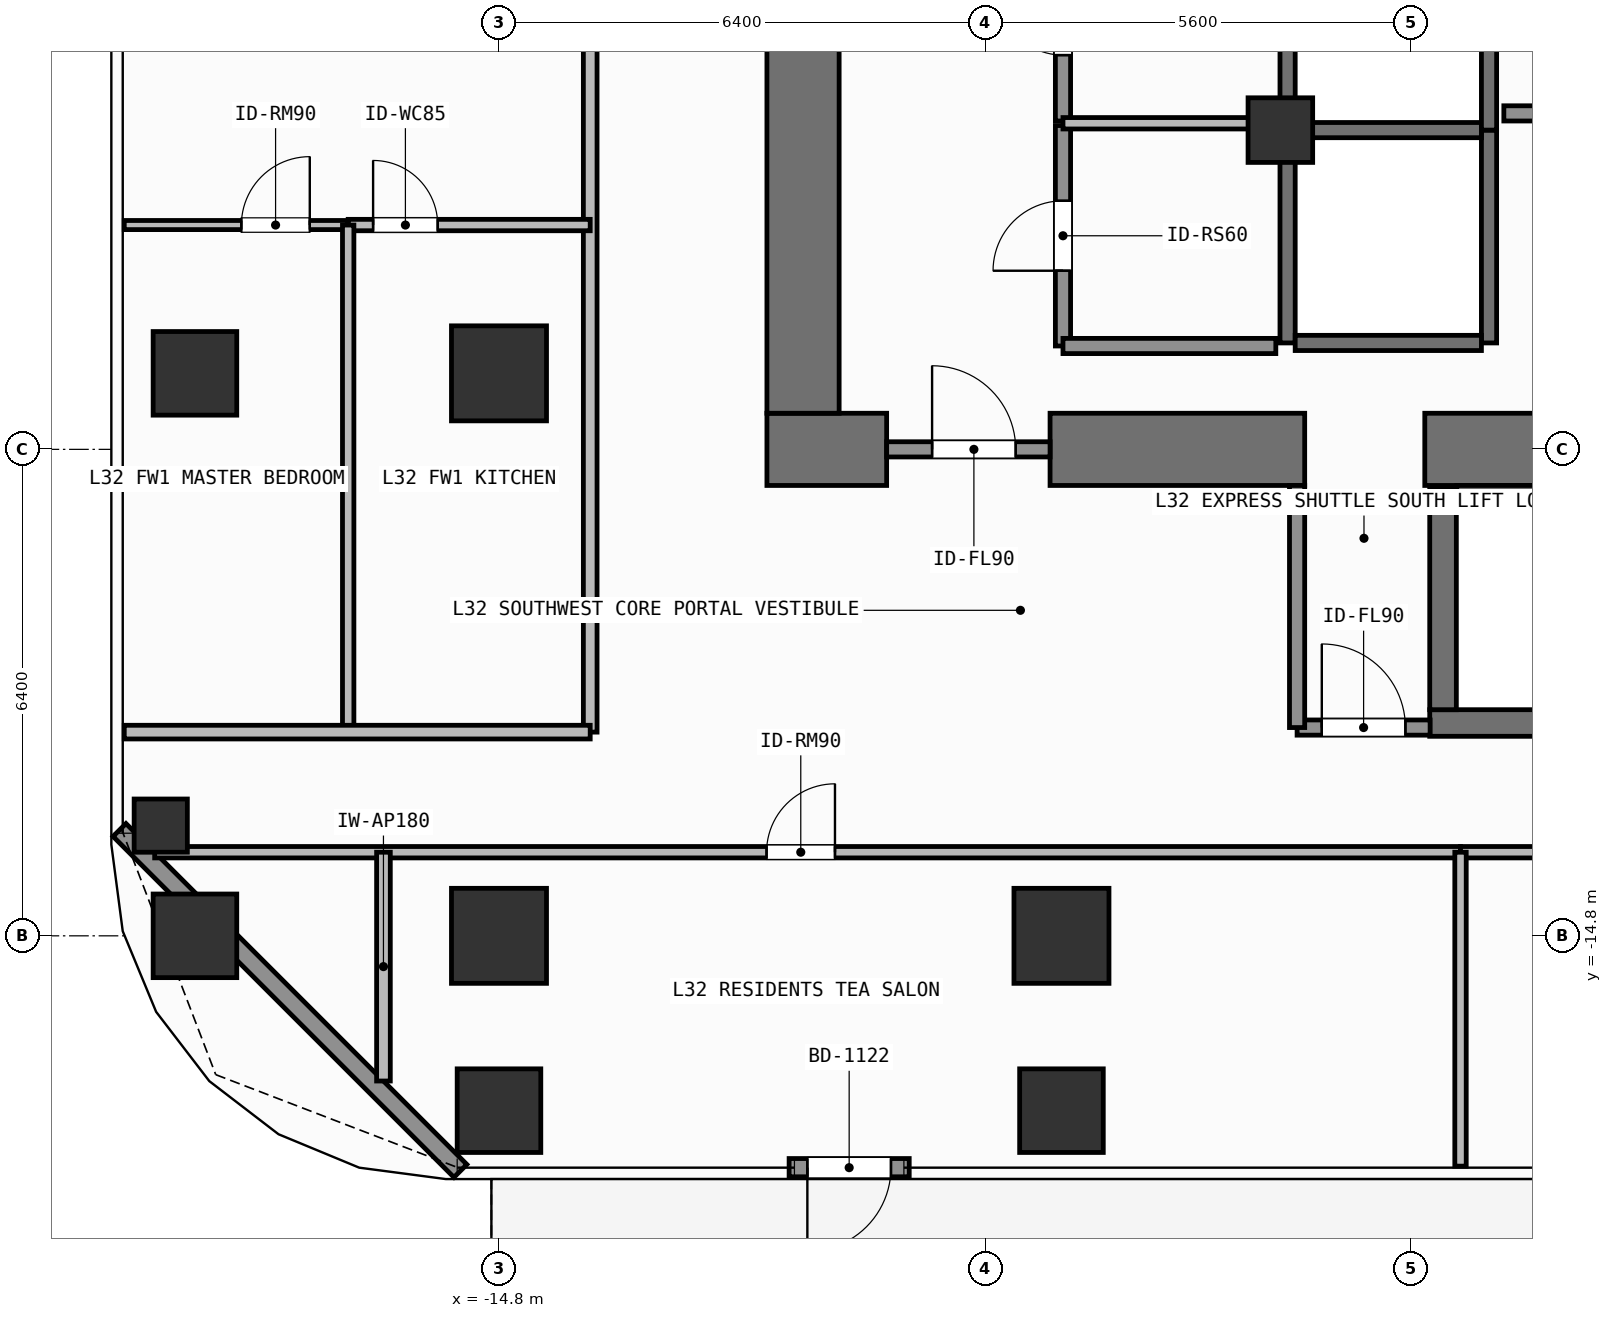
"""IFC4 building model, lengths in metres.
Left out: names, types, materials, properties, quantities, classifications, styles, units other than length and angle.
Written with IfcOpenShell. Run it as: python <this file> out.ifc"""

import sys

from ifc_helpers import new_model, si_unit, direction, frame, frame_2d, origin, origin_2d, place, context, subcontext, project, spatial, rectangle, hollow_rectangle, extrude, element, fill, save


model = new_model("IFC4")
c1 = context("Model", 3, precision=1e-05, world=origin(), true_north=direction((0.0, 1.0)))
c2 = subcontext(c1, "Body", "Model", "MODEL_VIEW")
j1 = project(units=[si_unit("LENGTHUNIT", "METRE"), si_unit("PLANEANGLEUNIT", "RADIAN")], contexts=[c1])
p1 = place(None, origin())
s1 = spatial("IfcSite", under=j1, at=p1, CompositionType="ELEMENT")
p2 = place(p1, origin())
s2 = spatial("IfcBuilding", under=s1, at=p2, CompositionType="ELEMENT")
p3 = place(p2, frame((0.0, 0.0, 129.0)))
s3 = spatial("IfcBuildingStorey", under=s2, at=p3, CompositionType="ELEMENT", Elevation=129.0)
p4 = place(p3, frame((-11.275, -8.4, 0.0), z_axis=(0.0, 0.0, 1.0), x_axis=(1.0, 0.0, 0.0)))
e1 = element("IfcWall", 1, at=p4, inside=s3, PredefinedType="SHEAR", context=c2, shape_type="SweptSolid", body=[
    extrude(rectangle(XDim=1.575, YDim=0.95, at=frame_2d((0.788, 0.0))), origin(), (0.0, 0.0, 1.0), 3.9),
])
p5 = place(p3, frame((-7.55, -8.4, 0.0), z_axis=(0.0, 0.0, 1.0), x_axis=(1.0, 0.0, 0.0)))
e2 = element("IfcWall", 2, at=p5, inside=s3, PredefinedType="SHEAR", context=c2, shape_type="SweptSolid", body=[
    extrude(rectangle(XDim=3.35, YDim=0.95, at=frame_2d((1.675, 0.0))), origin(), (0.0, 0.0, 1.0), 3.9),
])
p6 = place(p3, frame((-2.62, -8.4, 0.0), z_axis=(0.0, 0.0, 1.0), x_axis=(1.0, 0.0, 0.0)))
e3 = element("IfcWall", 3, at=p6, inside=s3, PredefinedType="SHEAR", context=c2, shape_type="SweptSolid", body=[
    extrude(rectangle(XDim=7.27, YDim=0.95, at=frame_2d((3.635, 0.0))), origin(), (0.0, 0.0, 1.0), 3.9),
])
p7 = place(p3, frame((-10.8, -7.925, 0.0), z_axis=(0.0, 0.0, 1.0), x_axis=(0.0, 1.0, 0.0)))
e4 = element("IfcWall", 4, at=p7, inside=s3, PredefinedType="SHEAR", context=c2, shape_type="SweptSolid", body=[
    extrude(rectangle(XDim=15.85, YDim=0.95, at=frame_2d((7.925, 0.0))), origin(), (0.0, 0.0, 1.0), 3.9),
])
p8 = place(p3, frame((-2.555, -12.0, 0.0), z_axis=(0.0, 0.0, 1.0), x_axis=(1.0, 0.0, 0.0)))
e5 = element("IfcWall", 5, at=p8, inside=s3, PredefinedType="SHEAR", context=c2, shape_type="SweptSolid", body=[
    extrude(rectangle(XDim=7.31, YDim=0.35, at=frame_2d((3.655, 0.0))), origin(), (0.0, 0.0, 1.0), 3.9),
])
p9 = place(p3, frame((-2.2, -8.95, 0.0), z_axis=(0.0, 0.0, 1.0), x_axis=(1.0, 0.0, 0.0)))
e6 = element("IfcWall", 6, at=p9, inside=s3, PredefinedType="SHEAR", context=c2, shape_type="SweptSolid", body=[
    extrude(rectangle(XDim=6.6, YDim=0.15, at=frame_2d((3.3, 0.0))), origin(), (0.0, 0.0, 1.0), 3.9),
])
p10 = place(p3, frame((-2.38, -11.825, 0.0), z_axis=(0.0, 0.0, 1.0), x_axis=(0.0, 1.0, 0.0)))
e7 = element("IfcWall", 7, at=p10, inside=s3, PredefinedType="SHEAR", context=c2, shape_type="SweptSolid", body=[
    extrude(rectangle(XDim=2.925, YDim=0.35, at=frame_2d((1.462, 0.0))), origin(), (0.0, 0.0, 1.0), 3.9),
])
for number, where, z_axis, x_axis in (
    (8, (-14.8, -14.8, 0.0), (0.0, 0.0, 1.0), (1.0, 0.0, 0.0)),
    (9, (-7.4, -14.8, 0.0), (0.0, 0.0, 1.0), (1.0, 0.0, 0.0)),
    (10, (-14.8, -7.4, 0.0), (0.0, 0.0, 1.0), (1.0, 0.0, 0.0)),
):
    element("IfcColumn", number, at=place(p3, frame(where, z_axis=z_axis, x_axis=x_axis)), inside=s3, PredefinedType="COLUMN", context=c2, shape_type="SweptSolid", body=[
        extrude(rectangle(XDim=1.25, YDim=1.25, at=origin_2d()), origin(), (0.0, 0.0, 1.0), 3.9),
    ])
p11 = place(p3, frame((-4.52, -4.2, 0.0), z_axis=(0.0, 0.0, 1.0), x_axis=(1.0, 0.0, 0.0)))
e11 = element("IfcColumn", 11, at=p11, inside=s3, PredefinedType="COLUMN", context=c2, shape_type="SweptSolid", body=[
    extrude(rectangle(XDim=0.85, YDim=0.85, at=origin_2d()), origin(), (0.0, 0.0, 1.0), 3.9),
])
for number, where, z_axis, x_axis in (
    (12, (-18.8, -14.8, 0.0), (0.0, 0.0, 1.0), (1.0, 0.0, 0.0)),
    (13, (-18.8, -7.4, 0.0), (0.0, 0.0, 1.0), (1.0, 0.0, 0.0)),
    (14, (-14.8, -17.1, 0.0), (0.0, 0.0, 1.0), (1.0, 0.0, 0.0)),
    (15, (-7.4, -17.1, 0.0), (0.0, 0.0, 1.0), (1.0, 0.0, 0.0)),
):
    element("IfcColumn", number, at=place(p3, frame(where, z_axis=z_axis, x_axis=x_axis)), inside=s3, PredefinedType="COLUMN", context=c2, shape_type="SweptSolid", body=[
        extrude(rectangle(XDim=1.1, YDim=1.1, at=origin_2d()), origin(), (0.0, 0.0, 1.0), 3.9),
    ])
p12 = place(p3, frame((-19.25, -13.35, 0.0), z_axis=(0.0, 0.0, 1.0), x_axis=(1.0, 0.0, 0.0)))
e16 = element("IfcColumn", 16, at=p12, inside=s3, PredefinedType="COLUMN", context=c2, shape_type="SweptSolid", body=[
    extrude(hollow_rectangle(XDim=0.7, YDim=0.7, WallThickness=0.032, at=origin_2d()), origin(), (0.0, 0.0, 1.0), 3.9),
])
p13 = place(p3, frame((-9.403, -17.85, 0.0), z_axis=(0.0, 0.0, 1.0), x_axis=(-1.0, 0.0, 0.0)))
e17 = element("IfcWall", 17, at=p13, inside=s3, PredefinedType="SOLIDWALL", context=c2, shape_type="SweptSolid", body=[
    extrude(rectangle(XDim=1.58, YDim=0.24, at=frame_2d((0.79, 0.0))), origin(), (0.0, 0.0, 1.0), 3.68),
])
p14 = place(p13, frame((0.24, 0.0, 0.0)))
e18 = element("IfcOpeningElement", 18, at=p14, cuts=e17, PredefinedType="OPENING", context=c2, shape_type="SweptSolid", body=[
    extrude(rectangle(XDim=1.1, YDim=2.2, at=frame_2d((0.55, 1.1))), frame((0.0, 0.13, 0.0), z_axis=(0.0, -1.0, 0.0), x_axis=(1.0, 0.0, 0.0)), (0.0, 0.0, 1.0), 0.26),
])
p15 = place(p3, frame((-15.308, -17.892, 0.0), z_axis=(0.0, 0.0, 1.0), x_axis=(-0.707126027686, 0.707087534163, 0.0)))
e19 = element("IfcWall", 19, at=p15, inside=s3, PredefinedType="SOLIDWALL", context=c2, shape_type="SweptSolid", body=[
    extrude(rectangle(XDim=6.342, YDim=0.24, at=frame_2d((3.171, 0.0))), origin(), (0.0, 0.0, 1.0), 3.68),
])
for number, where, z_axis, x_axis in (
    (20, (-4.425, -7.0, 0.0), (0.0, 0.0, 1.0), (0.0, 1.0, 0.0)),
    (21, (-1.775, -7.0, 0.0), (0.0, 0.0, 1.0), (0.0, 1.0, 0.0)),
):
    element("IfcWall", number, at=place(p3, frame(where, z_axis=z_axis, x_axis=x_axis)), inside=s3, PredefinedType="SHEAR", context=c2, shape_type="SweptSolid", body=[
        extrude(rectangle(XDim=2.8, YDim=0.2, at=frame_2d((1.4, 0.0))), origin(), (0.0, 0.0, 1.0), 3.68),
    ])
for number, where, z_axis, x_axis in (
    (22, (-4.325, -7.0, 0.0), (0.0, 0.0, 1.0), (1.0, 0.0, 0.0)),
    (23, (-4.325, -4.2, 0.0), (0.0, 0.0, 1.0), (1.0, 0.0, 0.0)),
):
    element("IfcWall", number, at=place(p3, frame(where, z_axis=z_axis, x_axis=x_axis)), inside=s3, PredefinedType="SHEAR", context=c2, shape_type="SweptSolid", body=[
        extrude(rectangle(XDim=2.45, YDim=0.2, at=frame_2d((1.225, 0.0))), origin(), (0.0, 0.0, 1.0), 3.68),
    ])
for number, where, z_axis, x_axis in (
    (24, (-4.425, -4.2, 0.0), (0.0, 0.0, 1.0), (0.0, 1.0, 0.0)),
    (25, (-1.775, -4.2, 0.0), (0.0, 0.0, 1.0), (0.0, 1.0, 0.0)),
):
    element("IfcWall", number, at=place(p3, frame(where, z_axis=z_axis, x_axis=x_axis)), inside=s3, PredefinedType="SHEAR", context=c2, shape_type="SweptSolid", body=[
        extrude(rectangle(XDim=2.8, YDim=0.2, at=frame_2d((1.4, 0.0))), origin(), (0.0, 0.0, 1.0), 3.68),
    ])
p16 = place(p3, frame((-9.7, -8.4, 0.0), z_axis=(0.0, 0.0, 1.0), x_axis=(1.0, 0.0, 0.0)))
e26 = element("IfcWall", 26, at=p16, inside=s3, PredefinedType="SOLIDWALL", context=c2, shape_type="SweptSolid", body=[
    extrude(rectangle(XDim=2.15, YDim=0.2, at=frame_2d((1.075, 0.0))), origin(), (0.0, 0.0, 1.0), 2.72),
])
p17 = place(p16, frame((0.598, 0.0, 0.0)))
e27 = element("IfcOpeningElement", 27, at=p17, cuts=e26, PredefinedType="OPENING", context=c2, shape_type="SweptSolid", body=[
    extrude(rectangle(XDim=1.1, YDim=2.15, at=frame_2d((0.55, 1.075))), frame((0.0, 0.11, 0.0), z_axis=(0.0, -1.0, 0.0), x_axis=(1.0, 0.0, 0.0)), (0.0, 0.0, 1.0), 0.22),
])
p18 = place(p3, frame((-4.3, -12.06, 0.0), z_axis=(0.0, 0.0, 1.0), x_axis=(1.0, 0.0, 0.0)))
e28 = element("IfcWall", 28, at=p18, inside=s3, PredefinedType="SOLIDWALL", context=c2, shape_type="SweptSolid", body=[
    extrude(rectangle(XDim=1.75, YDim=0.2, at=frame_2d((0.875, 0.0))), origin(), (0.0, 0.0, 1.0), 3.68),
])
p19 = place(p18, frame((0.325, 0.0, 0.0)))
e29 = element("IfcOpeningElement", 29, at=p19, cuts=e28, PredefinedType="OPENING", context=c2, shape_type="SweptSolid", body=[
    extrude(rectangle(XDim=1.1, YDim=2.15, at=frame_2d((0.55, 1.075))), frame((0.0, 0.11, 0.0), z_axis=(0.0, -1.0, 0.0), x_axis=(1.0, 0.0, 0.0)), (0.0, 0.0, 1.0), 0.22),
])
p20 = place(p3, frame((-7.38, -7.04, 0.0), z_axis=(0.0, 0.0, 1.0), x_axis=(0.0, 1.0, 0.0)))
e30 = element("IfcWall", 30, at=p20, inside=s3, PredefinedType="SOLIDWALL", context=c2, shape_type="SweptSolid", body=[
    extrude(rectangle(XDim=2.9, YDim=0.2, at=frame_2d((1.45, 0.0))), origin(), (0.0, 0.0, 1.0), 3.68),
])
p21 = place(p20, frame((0.99, 0.0, 0.0)))
e31 = element("IfcOpeningElement", 31, at=p21, cuts=e30, PredefinedType="OPENING", context=c2, shape_type="SweptSolid", body=[
    extrude(rectangle(XDim=0.92, YDim=2.1, at=frame_2d((0.46, 1.05))), frame((0.0, 0.11, 0.0), z_axis=(0.0, -1.0, 0.0), x_axis=(1.0, 0.0, 0.0)), (0.0, 0.0, 1.0), 0.22),
])
p22 = place(p3, frame((-7.38, -4.08, 0.0), z_axis=(0.0, 0.0, 1.0), x_axis=(0.0, 1.0, 0.0)))
e32 = element("IfcWall", 32, at=p22, inside=s3, PredefinedType="SOLIDWALL", context=c2, shape_type="SweptSolid", body=[
    extrude(rectangle(XDim=2.76, YDim=0.2, at=frame_2d((1.38, 0.0))), origin(), (0.0, 0.0, 1.0), 3.68),
])
p23 = place(p22, frame((0.867, 0.0, 0.0)))
e33 = element("IfcOpeningElement", 33, at=p23, cuts=e32, PredefinedType="OPENING", context=c2, shape_type="SweptSolid", body=[
    extrude(rectangle(XDim=0.85, YDim=2.1, at=frame_2d((0.425, 1.05))), frame((0.0, 0.11, 0.0), z_axis=(0.0, -1.0, 0.0), x_axis=(1.0, 0.0, 0.0)), (0.0, 0.0, 1.0), 0.22),
])
p24 = place(p3, frame((-19.33, -13.7, 0.0), z_axis=(0.0, 0.0, 1.0), x_axis=(1.0, 0.0, 0.0)))
e34 = element("IfcWall", 34, at=p24, inside=s3, PredefinedType="PARTITIONING", context=c2, shape_type="SweptSolid", body=[
    extrude(rectangle(XDim=17.18, YDim=0.15, at=frame_2d((8.59, 0.0))), origin(), (0.0, 0.0, 1.0), 3.68),
])
p25 = place(p24, frame((8.05, 0.0, 0.0)))
e35 = element("IfcOpeningElement", 35, at=p25, cuts=e34, PredefinedType="OPENING", context=c2, shape_type="SweptSolid", body=[
    extrude(rectangle(XDim=0.9, YDim=2.1, at=frame_2d((0.45, 1.05))), frame((0.0, 0.085, 0.0), z_axis=(0.0, -1.0, 0.0), x_axis=(1.0, 0.0, 0.0)), (0.0, 0.0, 1.0), 0.17),
])
p26 = place(p3, frame((-2.15, -13.7, 0.0), z_axis=(0.0, 0.0, 1.0), x_axis=(1.0, 0.0, 0.0)))
e36 = element("IfcWall", 36, at=p26, inside=s3, PredefinedType="PARTITIONING", context=c2, shape_type="SweptSolid", body=[
    extrude(rectangle(XDim=13.031, YDim=0.15, at=frame_2d((6.516, 0.0))), origin(), (0.0, 0.0, 1.0), 3.68),
])
p27 = place(p26, frame((6.065, 0.0, 0.0)))
e37 = element("IfcOpeningElement", 37, at=p27, cuts=e36, PredefinedType="OPENING", context=c2, shape_type="SweptSolid", body=[
    extrude(rectangle(XDim=0.9, YDim=2.1, at=frame_2d((0.45, 1.05))), frame((0.0, 0.085, 0.0), z_axis=(0.0, -1.0, 0.0), x_axis=(1.0, 0.0, 0.0)), (0.0, 0.0, 1.0), 0.17),
])
p28 = place(p3, frame((-13.6, -12.12, 0.0), z_axis=(0.0, 0.0, 1.0), x_axis=(0.0, 1.0, 0.0)))
e38 = element("IfcWall", 38, at=p28, inside=s3, PredefinedType="PARTITIONING", context=c2, shape_type="SweptSolid", body=[
    extrude(rectangle(XDim=24.24, YDim=0.18, at=frame_2d((12.12, 0.0))), origin(), (0.0, 0.0, 1.0), 3.68),
])
p29 = place(p28, frame((11.62, 0.0, 0.0)))
e39 = element("IfcOpeningElement", 39, at=p29, cuts=e38, PredefinedType="OPENING", context=c2, shape_type="SweptSolid", body=[
    extrude(rectangle(XDim=1.0, YDim=2.2, at=frame_2d((0.5, 1.1))), frame((0.0, 0.1, 0.0), z_axis=(0.0, -1.0, 0.0), x_axis=(1.0, 0.0, 0.0)), (0.0, 0.0, 1.0), 0.2),
])
p30 = place(p3, frame((-16.784, -5.449, 0.0), z_axis=(0.0, 0.0, 1.0), x_axis=(1.0, 0.0, 0.0)))
e40 = element("IfcWall", 40, at=p30, inside=s3, PredefinedType="PARTITIONING", context=c2, shape_type="SweptSolid", body=[
    extrude(rectangle(XDim=3.184, YDim=0.15, at=frame_2d((1.592, 0.0))), origin(), (0.0, 0.0, 1.0), 3.68),
])
p31 = place(p30, frame((0.328, 0.0, 0.0)))
e41 = element("IfcOpeningElement", 41, at=p31, cuts=e40, PredefinedType="OPENING", context=c2, shape_type="SweptSolid", body=[
    extrude(rectangle(XDim=0.85, YDim=2.1, at=frame_2d((0.425, 1.05))), frame((0.0, 0.085, 0.0), z_axis=(0.0, -1.0, 0.0), x_axis=(1.0, 0.0, 0.0)), (0.0, 0.0, 1.0), 0.17),
])
p32 = place(p3, frame((-19.73, -5.449, 0.0), z_axis=(0.0, 0.0, 1.0), x_axis=(1.0, 0.0, 0.0)))
e42 = element("IfcWall", 42, at=p32, inside=s3, PredefinedType="PARTITIONING", context=c2, shape_type="SweptSolid", body=[
    extrude(rectangle(XDim=2.946, YDim=0.12, at=frame_2d((1.473, 0.0))), origin(), (0.0, 0.0, 1.0), 3.68),
])
p33 = place(p32, frame((1.541, 0.0, 0.0)))
e43 = element("IfcOpeningElement", 43, at=p33, cuts=e42, PredefinedType="OPENING", context=c2, shape_type="SweptSolid", body=[
    extrude(rectangle(XDim=0.9, YDim=2.1, at=frame_2d((0.45, 1.05))), frame((0.0, 0.07, 0.0), z_axis=(0.0, -1.0, 0.0), x_axis=(1.0, 0.0, 0.0)), (0.0, 0.0, 1.0), 0.14),
])
p34 = place(p3, frame((-4.3, -12.06, 0.0), z_axis=(0.0, 0.0, 1.0), x_axis=(0.0, 1.0, 0.0)))
e44 = element("IfcWall", 44, at=p34, inside=s3, PredefinedType="SOLIDWALL", context=c2, shape_type="SweptSolid", body=[
    extrude(rectangle(XDim=3.185, YDim=0.2, at=frame_2d((1.593, 0.0))), origin(), (0.0, 0.0, 1.0), 3.68),
])
p35 = place(p3, frame((-1.58, -3.98, 0.0), z_axis=(0.0, 0.0, 1.0), x_axis=(1.0, 0.0, 0.0)))
e45 = element("IfcWall", 45, at=p35, inside=s3, PredefinedType="SOLIDWALL", context=c2, shape_type="SweptSolid", body=[
    extrude(rectangle(XDim=3.19, YDim=0.2, at=frame_2d((1.595, 0.0))), origin(), (0.0, 0.0, 1.0), 3.68),
])
p36 = place(p3, frame((-7.38, -7.04, 0.0), z_axis=(0.0, 0.0, 1.0), x_axis=(1.0, 0.0, 0.0)))
e46 = element("IfcWall", 46, at=p36, inside=s3, PredefinedType="SOLIDWALL", context=c2, shape_type="SweptSolid", body=[
    extrude(rectangle(XDim=2.8, YDim=0.2, at=frame_2d((1.4, 0.0))), origin(), (0.0, 0.0, 1.0), 3.68),
])
p37 = place(p3, frame((-7.38, -4.11, 0.0), z_axis=(0.0, 0.0, 1.0), x_axis=(1.0, 0.0, 0.0)))
e47 = element("IfcWall", 47, at=p37, inside=s3, PredefinedType="PARTITIONING", context=c2, shape_type="SweptSolid", body=[
    extrude(rectangle(XDim=2.8, YDim=0.15, at=frame_2d((1.4, 0.0))), origin(), (0.0, 0.0, 1.0), 3.68),
])
p38 = place(p3, frame((-16.32, -16.71, 0.0), z_axis=(0.0, 0.0, 1.0), x_axis=(0.0, 1.0, 0.0)))
e48 = element("IfcWall", 48, at=p38, inside=s3, PredefinedType="PARTITIONING", context=c2, shape_type="SweptSolid", body=[
    extrude(rectangle(XDim=3.01, YDim=0.18, at=frame_2d((1.505, 0.0))), origin(), (0.0, 0.0, 1.0), 3.68),
])
p39 = place(p3, frame((-2.15, -17.83, 0.0), z_axis=(0.0, 0.0, 1.0), x_axis=(0.0, 1.0, 0.0)))
e49 = element("IfcWall", 49, at=p39, inside=s3, PredefinedType="PARTITIONING", context=c2, shape_type="SweptSolid", body=[
    extrude(rectangle(XDim=4.13, YDim=0.15, at=frame_2d((2.065, 0.0))), origin(), (0.0, 0.0, 1.0), 3.68),
])
p40 = place(p3, frame((-16.784, -12.12, 0.0), z_axis=(0.0, 0.0, 1.0), x_axis=(0.0, 1.0, 0.0)))
e50 = element("IfcWall", 50, at=p40, inside=s3, PredefinedType="PARTITIONING", context=c2, shape_type="SweptSolid", body=[
    extrude(rectangle(XDim=6.671, YDim=0.15, at=frame_2d((3.335, 0.0))), origin(), (0.0, 0.0, 1.0), 3.68),
])
p41 = place(p3, frame((-19.73, -12.12, 0.0), z_axis=(0.0, 0.0, 1.0), x_axis=(1.0, 0.0, 0.0)))
e51 = element("IfcWall", 51, at=p41, inside=s3, PredefinedType="PARTITIONING", context=c2, shape_type="SweptSolid", body=[
    extrude(rectangle(XDim=6.13, YDim=0.18, at=frame_2d((3.065, 0.0))), origin(), (0.0, 0.0, 1.0), 3.68),
])
p42 = place(p14, origin())
e52 = element("IfcDoor", 52, at=p42, inside=s3, OperationType="SINGLE_SWING_RIGHT", PredefinedType="DOOR", context=c2, shape_type="SweptSolid", body=[
    extrude(rectangle(XDim=1.1, YDim=2.2, at=frame_2d((0.55, 1.1))), frame((0.0, 0.025, 0.0), z_axis=(0.0, -1.0, 0.0), x_axis=(1.0, 0.0, 0.0)), (0.0, 0.0, 1.0), 0.05),
])
fill(e18, e52)
p43 = place(p17, origin())
e53 = element("IfcDoor", 53, at=p43, inside=s3, OperationType="SINGLE_SWING_LEFT", PredefinedType="DOOR", context=c2, shape_type="SweptSolid", body=[
    extrude(rectangle(XDim=1.1, YDim=2.15, at=frame_2d((0.55, 1.075))), frame((0.0, 0.025, 0.0), z_axis=(0.0, -1.0, 0.0), x_axis=(1.0, 0.0, 0.0)), (0.0, 0.0, 1.0), 0.05),
])
fill(e27, e53)
p44 = place(p19, origin())
e54 = element("IfcDoor", 54, at=p44, inside=s3, OperationType="SINGLE_SWING_LEFT", PredefinedType="DOOR", context=c2, shape_type="SweptSolid", body=[
    extrude(rectangle(XDim=1.1, YDim=2.15, at=frame_2d((0.55, 1.075))), frame((0.0, 0.025, 0.0), z_axis=(0.0, -1.0, 0.0), x_axis=(1.0, 0.0, 0.0)), (0.0, 0.0, 1.0), 0.05),
])
fill(e29, e54)
p45 = place(p21, origin())
e55 = element("IfcDoor", 55, at=p45, inside=s3, OperationType="SINGLE_SWING_LEFT", PredefinedType="DOOR", context=c2, shape_type="SweptSolid", body=[
    extrude(rectangle(XDim=0.92, YDim=2.1, at=frame_2d((0.46, 1.05))), frame((0.0, 0.025, 0.0), z_axis=(0.0, -1.0, 0.0), x_axis=(1.0, 0.0, 0.0)), (0.0, 0.0, 1.0), 0.05),
])
fill(e31, e55)
p46 = place(p23, origin())
e56 = element("IfcDoor", 56, at=p46, inside=s3, OperationType="SINGLE_SWING_RIGHT", PredefinedType="DOOR", context=c2, shape_type="SweptSolid", body=[
    extrude(rectangle(XDim=0.85, YDim=2.1, at=frame_2d((0.425, 1.05))), frame((0.0, 0.025, 0.0), z_axis=(0.0, -1.0, 0.0), x_axis=(1.0, 0.0, 0.0)), (0.0, 0.0, 1.0), 0.05),
])
fill(e33, e56)
p47 = place(p25, origin())
e57 = element("IfcDoor", 57, at=p47, inside=s3, OperationType="SINGLE_SWING_RIGHT", PredefinedType="DOOR", context=c2, shape_type="SweptSolid", body=[
    extrude(rectangle(XDim=0.9, YDim=2.1, at=frame_2d((0.45, 1.05))), frame((0.0, 0.025, 0.0), z_axis=(0.0, -1.0, 0.0), x_axis=(1.0, 0.0, 0.0)), (0.0, 0.0, 1.0), 0.05),
])
fill(e35, e57)
p48 = place(p31, origin())
e58 = element("IfcDoor", 58, at=p48, inside=s3, OperationType="SINGLE_SWING_LEFT", PredefinedType="DOOR", context=c2, shape_type="SweptSolid", body=[
    extrude(rectangle(XDim=0.85, YDim=2.1, at=frame_2d((0.425, 1.05))), frame((0.0, 0.025, 0.0), z_axis=(0.0, -1.0, 0.0), x_axis=(1.0, 0.0, 0.0)), (0.0, 0.0, 1.0), 0.05),
])
fill(e41, e58)
p49 = place(p33, origin())
e59 = element("IfcDoor", 59, at=p49, inside=s3, OperationType="SINGLE_SWING_RIGHT", PredefinedType="DOOR", context=c2, shape_type="SweptSolid", body=[
    extrude(rectangle(XDim=0.9, YDim=2.1, at=frame_2d((0.45, 1.05))), frame((0.0, 0.025, 0.0), z_axis=(0.0, -1.0, 0.0), x_axis=(1.0, 0.0, 0.0)), (0.0, 0.0, 1.0), 0.05),
])
fill(e43, e59)
save(model, sys.argv[1])
